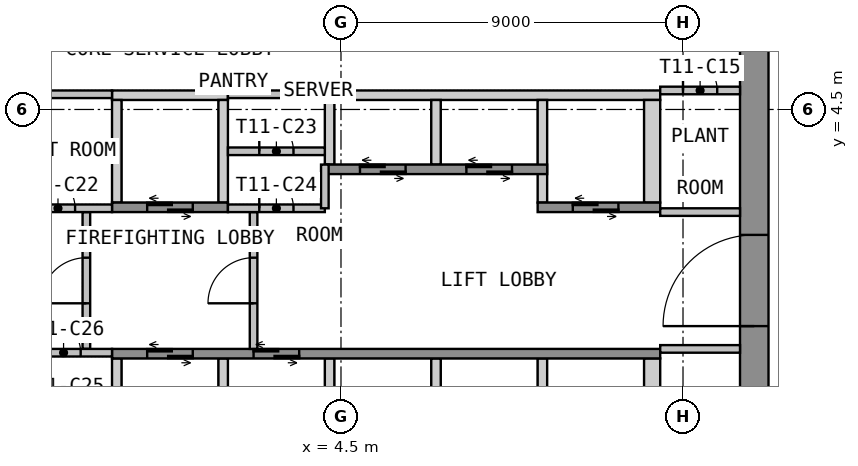
"""IFC4 building model, lengths in metres.
Left out: names, types, materials, properties, quantities, classifications, styles, units other than length and angle.
Written with IfcOpenShell. Run it as: python <this file> out.ifc"""

import sys

from ifc_helpers import new_model, si_unit, direction, frame, frame_2d, origin, place, context, subcontext, project, spatial, polyline, rectangle, outline, extrude, element, fill, save


model = new_model("IFC4")
c1 = context("Model", 3, precision=1e-05, world=origin(), true_north=direction((0.0, 1.0)))
c2 = subcontext(c1, "Body", "Model", "MODEL_VIEW")
j1 = project(units=[si_unit("LENGTHUNIT", "METRE"), si_unit("PLANEANGLEUNIT", "RADIAN")], contexts=[c1])
p1 = place(None, origin())
s1 = spatial("IfcSite", under=j1, at=p1, CompositionType="ELEMENT")
p2 = place(p1, origin())
s2 = spatial("IfcBuilding", under=s1, at=p2, CompositionType="ELEMENT")
p3 = place(p2, frame((0.0, 0.0, 156.0)))
s3 = spatial("IfcBuildingStorey", under=s2, at=p3, CompositionType="ELEMENT", Elevation=156.0)
p4 = place(p3, frame((15.375, -12.75, 0.0), z_axis=(0.0, 0.0, 1.0), x_axis=(0.0, 1.0, 0.0)))
e1 = element("IfcWall", 1, at=p4, inside=s3, PredefinedType="SHEAR", context=c2, shape_type="SweptSolid", body=[
    extrude(rectangle(XDim=25.5, YDim=0.75, at=frame_2d((12.75, 0.0))), origin(), (0.0, 0.0, 1.0), 3.575),
])
p5 = place(p4, frame((11.55, 0.0, 0.0)))
e2 = element("IfcOpeningElement", 2, at=p5, cuts=e1, PredefinedType="OPENING", context=c2, shape_type="SweptSolid", body=[
    extrude(rectangle(XDim=2.4, YDim=2.1, at=frame_2d((1.2, 1.05))), frame((0.0, 0.385, 0.0), z_axis=(0.0, -1.0, 0.0), x_axis=(1.0, 0.0, 0.0)), (0.0, 0.0, 1.0), 0.77),
])
p6 = place(p3, origin())
e3 = element("IfcWall", 3, at=p6, inside=s3, PredefinedType="SHEAR", context=c2, shape_type="SweptSolid", body=[
    extrude(outline(polyline([(-1.525, 4.75), (1.525, 4.75), (1.525, 5.0), (-1.525, 5.0), (-1.525, 4.75)])), origin(), (0.0, 0.0, 1.0), 3.575),
])
p7 = place(p3, origin())
e4 = element("IfcWall", 4, at=p7, inside=s3, PredefinedType="SHEAR", context=c2, shape_type="SweptSolid", body=[
    extrude(outline(polyline([(4.075, 4.75), (12.9, 4.75), (12.9, 5.0), (4.075, 5.0), (4.075, 4.75)])), origin(), (0.0, 0.0, 1.0), 3.575),
])
p8 = place(p3, origin())
e5 = element("IfcWall", 5, at=p8, inside=s3, PredefinedType="SHEAR", context=c2, shape_type="SweptSolid", body=[
    extrude(outline(polyline([(-1.525, 2.05), (-1.275, 2.05), (-1.275, 4.75), (-1.525, 4.75), (-1.525, 2.05)])), origin(), (0.0, 0.0, 1.0), 3.575),
])
p9 = place(p3, origin())
e6 = element("IfcWall", 6, at=p9, inside=s3, PredefinedType="SHEAR", context=c2, shape_type="SweptSolid", body=[
    extrude(outline(polyline([(1.275, 2.05), (1.525, 2.05), (1.525, 4.75), (1.275, 4.75), (1.275, 2.05)])), origin(), (0.0, 0.0, 1.0), 3.575),
])
p10 = place(p3, origin())
e7 = element("IfcWall", 7, at=p10, inside=s3, PredefinedType="SHEAR", context=c2, shape_type="SweptSolid", body=[
    extrude(outline(polyline([(9.675, 2.05), (9.925, 2.05), (9.925, 4.75), (9.675, 4.75), (9.675, 2.05)])), origin(), (0.0, 0.0, 1.0), 3.575),
])
p11 = place(p3, origin())
e8 = element("IfcWall", 8, at=p11, inside=s3, PredefinedType="SHEAR", context=c2, shape_type="SweptSolid", body=[
    extrude(outline(polyline([(12.475, 2.05), (12.9, 2.05), (12.9, 4.75), (12.475, 4.75), (12.475, 2.05)])), origin(), (0.0, 0.0, 1.0), 3.575),
])
p12 = place(p3, origin())
e9 = element("IfcWall", 9, at=p12, inside=s3, PredefinedType="SHEAR", context=c2, shape_type="SweptSolid", body=[
    extrude(outline(polyline([(4.075, 3.05), (4.325, 3.05), (4.325, 4.75), (4.075, 4.75), (4.075, 3.05)])), origin(), (0.0, 0.0, 1.0), 3.575),
])
p13 = place(p3, origin())
e10 = element("IfcWall", 10, at=p13, inside=s3, PredefinedType="SHEAR", context=c2, shape_type="SweptSolid", body=[
    extrude(outline(polyline([(6.875, 3.05), (7.125, 3.05), (7.125, 4.75), (6.875, 4.75), (6.875, 3.05)])), origin(), (0.0, 0.0, 1.0), 3.575),
])
p14 = place(p3, frame((-1.525, 1.925, 0.0), z_axis=(0.0, 0.0, 1.0), x_axis=(1.0, 0.0, 0.0)))
e11 = element("IfcWall", 11, at=p14, inside=s3, PredefinedType="SHEAR", context=c2, shape_type="SweptSolid", body=[
    extrude(rectangle(XDim=3.05, YDim=0.25, at=frame_2d((1.525, 0.0))), origin(), (0.0, 0.0, 1.0), 3.575),
])
p15 = place(p14, frame((0.925, 0.0, 0.0)))
e12 = element("IfcOpeningElement", 12, at=p15, cuts=e11, PredefinedType="OPENING", context=c2, shape_type="SweptSolid", body=[
    extrude(rectangle(XDim=1.2, YDim=2.1, at=frame_2d((0.6, 1.05))), frame((0.0, 0.135, 0.0), z_axis=(0.0, -1.0, 0.0), x_axis=(1.0, 0.0, 0.0)), (0.0, 0.0, 1.0), 0.27),
])
p16 = place(p3, frame((4.075, 2.925, 0.0), z_axis=(0.0, 0.0, 1.0), x_axis=(1.0, 0.0, 0.0)))
e13 = element("IfcWall", 13, at=p16, inside=s3, PredefinedType="SHEAR", context=c2, shape_type="SweptSolid", body=[
    extrude(rectangle(XDim=5.85, YDim=0.25, at=frame_2d((2.925, 0.0))), origin(), (0.0, 0.0, 1.0), 3.575),
])
p17 = place(p16, frame((0.925, 0.0, 0.0)))
e14 = element("IfcOpeningElement", 14, at=p17, cuts=e13, PredefinedType="OPENING", context=c2, shape_type="SweptSolid", body=[
    extrude(rectangle(XDim=1.2, YDim=2.1, at=frame_2d((0.6, 1.05))), frame((0.0, 0.135, 0.0), z_axis=(0.0, -1.0, 0.0), x_axis=(1.0, 0.0, 0.0)), (0.0, 0.0, 1.0), 0.27),
])
p18 = place(p16, frame((3.725, 0.0, 0.0)))
e15 = element("IfcOpeningElement", 15, at=p18, cuts=e13, PredefinedType="OPENING", context=c2, shape_type="SweptSolid", body=[
    extrude(rectangle(XDim=1.2, YDim=2.1, at=frame_2d((0.6, 1.05))), frame((0.0, 0.135, 0.0), z_axis=(0.0, -1.0, 0.0), x_axis=(1.0, 0.0, 0.0)), (0.0, 0.0, 1.0), 0.27),
])
p19 = place(p3, frame((9.675, 1.925, 0.0), z_axis=(0.0, 0.0, 1.0), x_axis=(1.0, 0.0, 0.0)))
e16 = element("IfcWall", 16, at=p19, inside=s3, PredefinedType="SHEAR", context=c2, shape_type="SweptSolid", body=[
    extrude(rectangle(XDim=3.225, YDim=0.25, at=frame_2d((1.612, 0.0))), origin(), (0.0, 0.0, 1.0), 3.575),
])
p20 = place(p19, frame((0.925, 0.0, 0.0)))
e17 = element("IfcOpeningElement", 17, at=p20, cuts=e16, PredefinedType="OPENING", context=c2, shape_type="SweptSolid", body=[
    extrude(rectangle(XDim=1.2, YDim=2.1, at=frame_2d((0.6, 1.05))), frame((0.0, 0.135, 0.0), z_axis=(0.0, -1.0, 0.0), x_axis=(1.0, 0.0, 0.0)), (0.0, 0.0, 1.0), 0.27),
])
p21 = place(p3, origin())
e18 = element("IfcWall", 18, at=p21, inside=s3, PredefinedType="SHEAR", context=c2, shape_type="SweptSolid", body=[
    extrude(outline(polyline([(-1.525, -4.75), (-1.275, -4.75), (-1.275, -2.05), (-1.525, -2.05), (-1.525, -4.75)])), origin(), (0.0, 0.0, 1.0), 3.575),
])
p22 = place(p3, origin())
e19 = element("IfcWall", 19, at=p22, inside=s3, PredefinedType="SHEAR", context=c2, shape_type="SweptSolid", body=[
    extrude(outline(polyline([(1.275, -4.75), (1.525, -4.75), (1.525, -2.05), (1.275, -2.05), (1.275, -4.75)])), origin(), (0.0, 0.0, 1.0), 3.575),
])
p23 = place(p3, origin())
e20 = element("IfcWall", 20, at=p23, inside=s3, PredefinedType="SHEAR", context=c2, shape_type="SweptSolid", body=[
    extrude(outline(polyline([(4.075, -4.75), (4.325, -4.75), (4.325, -2.05), (4.075, -2.05), (4.075, -4.75)])), origin(), (0.0, 0.0, 1.0), 3.575),
])
p24 = place(p3, origin())
e21 = element("IfcWall", 21, at=p24, inside=s3, PredefinedType="SHEAR", context=c2, shape_type="SweptSolid", body=[
    extrude(outline(polyline([(6.875, -4.75), (7.125, -4.75), (7.125, -2.05), (6.875, -2.05), (6.875, -4.75)])), origin(), (0.0, 0.0, 1.0), 3.575),
])
p25 = place(p3, origin())
e22 = element("IfcWall", 22, at=p25, inside=s3, PredefinedType="SHEAR", context=c2, shape_type="SweptSolid", body=[
    extrude(outline(polyline([(9.675, -4.75), (9.925, -4.75), (9.925, -2.05), (9.675, -2.05), (9.675, -4.75)])), origin(), (0.0, 0.0, 1.0), 3.575),
])
p26 = place(p3, origin())
e23 = element("IfcWall", 23, at=p26, inside=s3, PredefinedType="SHEAR", context=c2, shape_type="SweptSolid", body=[
    extrude(outline(polyline([(12.475, -4.75), (12.9, -4.75), (12.9, -2.05), (12.475, -2.05), (12.475, -4.75)])), origin(), (0.0, 0.0, 1.0), 3.575),
])
p27 = place(p3, frame((-1.525, -1.925, 0.0), z_axis=(0.0, 0.0, 1.0), x_axis=(1.0, 0.0, 0.0)))
e24 = element("IfcWall", 24, at=p27, inside=s3, PredefinedType="SHEAR", context=c2, shape_type="SweptSolid", body=[
    extrude(rectangle(XDim=14.425, YDim=0.25, at=frame_2d((7.212, 0.0))), origin(), (0.0, 0.0, 1.0), 3.575),
])
p28 = place(p27, frame((0.925, 0.0, 0.0)))
e25 = element("IfcOpeningElement", 25, at=p28, cuts=e24, PredefinedType="OPENING", context=c2, shape_type="SweptSolid", body=[
    extrude(rectangle(XDim=1.2, YDim=2.1, at=frame_2d((0.6, 1.05))), frame((0.0, 0.135, 0.0), z_axis=(0.0, -1.0, 0.0), x_axis=(1.0, 0.0, 0.0)), (0.0, 0.0, 1.0), 0.27),
])
p29 = place(p27, frame((3.725, 0.0, 0.0)))
e26 = element("IfcOpeningElement", 26, at=p29, cuts=e24, PredefinedType="OPENING", context=c2, shape_type="SweptSolid", body=[
    extrude(rectangle(XDim=1.2, YDim=2.1, at=frame_2d((0.6, 1.05))), frame((0.0, 0.135, 0.0), z_axis=(0.0, -1.0, 0.0), x_axis=(1.0, 0.0, 0.0)), (0.0, 0.0, 1.0), 0.27),
])
p30 = place(p3, frame((-2.2, -1.8, 0.0), z_axis=(0.0, 0.0, 1.0), x_axis=(0.0, 1.0, 0.0)))
e27 = element("IfcWall", 27, at=p30, inside=s3, PredefinedType="PARTITIONING", context=c2, shape_type="SweptSolid", body=[
    extrude(rectangle(XDim=3.6, YDim=0.2, at=frame_2d((1.8, 0.0))), origin(), (0.0, 0.0, 1.0), 3.575),
])
p31 = place(p30, frame((1.2, 0.0, 0.0)))
e28 = element("IfcOpeningElement", 28, at=p31, cuts=e27, PredefinedType="OPENING", context=c2, shape_type="SweptSolid", body=[
    extrude(rectangle(XDim=1.2, YDim=2.1, at=frame_2d((0.6, 1.05))), frame((0.0, 0.11, 0.0), z_axis=(0.0, -1.0, 0.0), x_axis=(1.0, 0.0, 0.0)), (0.0, 0.0, 1.0), 0.22),
])
p32 = place(p3, frame((2.2, -1.8, 0.0), z_axis=(0.0, 0.0, 1.0), x_axis=(0.0, 1.0, 0.0)))
e29 = element("IfcWall", 29, at=p32, inside=s3, PredefinedType="PARTITIONING", context=c2, shape_type="SweptSolid", body=[
    extrude(rectangle(XDim=3.6, YDim=0.2, at=frame_2d((1.8, 0.0))), origin(), (0.0, 0.0, 1.0), 3.575),
])
p33 = place(p32, frame((1.2, 0.0, 0.0)))
e30 = element("IfcOpeningElement", 30, at=p33, cuts=e29, PredefinedType="OPENING", context=c2, shape_type="SweptSolid", body=[
    extrude(rectangle(XDim=1.2, YDim=2.1, at=frame_2d((0.6, 1.05))), frame((0.0, 0.11, 0.0), z_axis=(0.0, -1.0, 0.0), x_axis=(1.0, 0.0, 0.0)), (0.0, 0.0, 1.0), 0.22),
])
p34 = place(p3, frame((12.9, 5.0, 0.0), z_axis=(0.0, 0.0, 1.0), x_axis=(1.0, 0.0, 0.0)))
e31 = element("IfcWall", 31, at=p34, inside=s3, PredefinedType="PARTITIONING", context=c2, shape_type="SweptSolid", body=[
    extrude(rectangle(XDim=2.1, YDim=0.2, at=frame_2d((1.05, 0.0))), origin(), (0.0, 0.0, 1.0), 3.575),
])
p35 = place(p34, frame((0.6, 0.0, 0.0)))
e32 = element("IfcOpeningElement", 32, at=p35, cuts=e31, PredefinedType="OPENING", context=c2, shape_type="SweptSolid", body=[
    extrude(rectangle(XDim=0.9, YDim=2.1, at=frame_2d((0.45, 1.05))), frame((0.0, 0.11, 0.0), z_axis=(0.0, -1.0, 0.0), x_axis=(1.0, 0.0, 0.0)), (0.0, 0.0, 1.0), 0.22),
])
for number, where, z_axis, x_axis in (
    (33, (12.9, 1.8, 0.0), (0.0, 0.0, 1.0), (1.0, 0.0, 0.0)),
    (34, (12.9, -1.8, 0.0), (0.0, 0.0, 1.0), (1.0, 0.0, 0.0)),
):
    element("IfcWall", number, at=place(p3, frame(where, z_axis=z_axis, x_axis=x_axis)), inside=s3, PredefinedType="PARTITIONING", context=c2, shape_type="SweptSolid", body=[
        extrude(rectangle(XDim=2.1, YDim=0.2, at=frame_2d((1.05, 0.0))), origin(), (0.0, 0.0, 1.0), 3.575),
    ])
p36 = place(p3, frame((-12.9, 1.9, 0.0), z_axis=(0.0, 0.0, 1.0), x_axis=(1.0, 0.0, 0.0)))
e35 = element("IfcWall", 35, at=p36, inside=s3, PredefinedType="PARTITIONING", context=c2, shape_type="SweptSolid", body=[
    extrude(rectangle(XDim=11.375, YDim=0.2, at=frame_2d((5.688, 0.0))), origin(), (0.0, 0.0, 1.0), 3.575),
])
p37 = place(p36, frame((0.972, 0.0, 0.0)))
e36 = element("IfcOpeningElement", 36, at=p37, cuts=e35, PredefinedType="OPENING", context=c2, shape_type="SweptSolid", body=[
    extrude(rectangle(XDim=0.9, YDim=2.1, at=frame_2d((0.45, 1.05))), frame((0.0, 0.11, 0.0), z_axis=(0.0, -1.0, 0.0), x_axis=(1.0, 0.0, 0.0)), (0.0, 0.0, 1.0), 0.22),
])
p38 = place(p36, frame((5.087, 0.0, 0.0)))
e37 = element("IfcOpeningElement", 37, at=p38, cuts=e35, PredefinedType="OPENING", context=c2, shape_type="SweptSolid", body=[
    extrude(rectangle(XDim=1.2, YDim=2.1, at=frame_2d((0.6, 1.05))), frame((0.0, 0.11, 0.0), z_axis=(0.0, -1.0, 0.0), x_axis=(1.0, 0.0, 0.0)), (0.0, 0.0, 1.0), 0.22),
])
p39 = place(p36, frame((9.503, 0.0, 0.0)))
e38 = element("IfcOpeningElement", 38, at=p39, cuts=e35, PredefinedType="OPENING", context=c2, shape_type="SweptSolid", body=[
    extrude(rectangle(XDim=0.9, YDim=2.1, at=frame_2d((0.45, 1.05))), frame((0.0, 0.11, 0.0), z_axis=(0.0, -1.0, 0.0), x_axis=(1.0, 0.0, 0.0)), (0.0, 0.0, 1.0), 0.22),
])
p40 = place(p3, frame((-12.9, 4.9, 0.0), z_axis=(0.0, 0.0, 1.0), x_axis=(1.0, 0.0, 0.0)))
e39 = element("IfcWall", 39, at=p40, inside=s3, PredefinedType="PARTITIONING", context=c2, shape_type="SweptSolid", body=[
    extrude(rectangle(XDim=11.375, YDim=0.2, at=frame_2d((5.688, 0.0))), origin(), (0.0, 0.0, 1.0), 3.575),
])
p41 = place(p3, frame((1.525, 3.4, 0.0), z_axis=(0.0, 0.0, 1.0), x_axis=(1.0, 0.0, 0.0)))
e40 = element("IfcWall", 40, at=p41, inside=s3, PredefinedType="PARTITIONING", context=c2, shape_type="SweptSolid", body=[
    extrude(rectangle(XDim=2.55, YDim=0.2, at=frame_2d((1.275, 0.0))), origin(), (0.0, 0.0, 1.0), 3.575),
])
p42 = place(p41, frame((0.825, 0.0, 0.0)))
e41 = element("IfcOpeningElement", 41, at=p42, cuts=e40, PredefinedType="OPENING", context=c2, shape_type="SweptSolid", body=[
    extrude(rectangle(XDim=0.9, YDim=2.1, at=frame_2d((0.45, 1.05))), frame((0.0, 0.11, 0.0), z_axis=(0.0, -1.0, 0.0), x_axis=(1.0, 0.0, 0.0)), (0.0, 0.0, 1.0), 0.22),
])
p43 = place(p3, frame((1.525, 1.9, 0.0), z_axis=(0.0, 0.0, 1.0), x_axis=(1.0, 0.0, 0.0)))
e42 = element("IfcWall", 42, at=p43, inside=s3, PredefinedType="PARTITIONING", context=c2, shape_type="SweptSolid", body=[
    extrude(rectangle(XDim=2.55, YDim=0.2, at=frame_2d((1.275, 0.0))), origin(), (0.0, 0.0, 1.0), 3.575),
])
p44 = place(p43, frame((0.825, 0.0, 0.0)))
e43 = element("IfcOpeningElement", 43, at=p44, cuts=e42, PredefinedType="OPENING", context=c2, shape_type="SweptSolid", body=[
    extrude(rectangle(XDim=0.9, YDim=2.1, at=frame_2d((0.45, 1.05))), frame((0.0, 0.11, 0.0), z_axis=(0.0, -1.0, 0.0), x_axis=(1.0, 0.0, 0.0)), (0.0, 0.0, 1.0), 0.22),
])
p45 = place(p3, frame((1.525, 4.9, 0.0), z_axis=(0.0, 0.0, 1.0), x_axis=(1.0, 0.0, 0.0)))
e44 = element("IfcWall", 44, at=p45, inside=s3, PredefinedType="PARTITIONING", context=c2, shape_type="SweptSolid", body=[
    extrude(rectangle(XDim=2.55, YDim=0.2, at=frame_2d((1.275, 0.0))), origin(), (0.0, 0.0, 1.0), 3.575),
])
p46 = place(p3, frame((4.075, 1.9, 0.0), z_axis=(0.0, 0.0, 1.0), x_axis=(0.0, 1.0, 0.0)))
e45 = element("IfcWall", 45, at=p46, inside=s3, PredefinedType="PARTITIONING", context=c2, shape_type="SweptSolid", body=[
    extrude(rectangle(XDim=1.15, YDim=0.2, at=frame_2d((0.575, 0.0))), origin(), (0.0, 0.0, 1.0), 3.575),
])
p47 = place(p3, frame((-4.075, -1.9, 0.0), z_axis=(0.0, 0.0, 1.0), x_axis=(1.0, 0.0, 0.0)))
e46 = element("IfcWall", 46, at=p47, inside=s3, PredefinedType="PARTITIONING", context=c2, shape_type="SweptSolid", body=[
    extrude(rectangle(XDim=2.55, YDim=0.2, at=frame_2d((1.275, 0.0))), origin(), (0.0, 0.0, 1.0), 3.575),
])
p48 = place(p47, frame((0.825, 0.0, 0.0)))
e47 = element("IfcOpeningElement", 47, at=p48, cuts=e46, PredefinedType="OPENING", context=c2, shape_type="SweptSolid", body=[
    extrude(rectangle(XDim=0.9, YDim=2.1, at=frame_2d((0.45, 1.05))), frame((0.0, 0.11, 0.0), z_axis=(0.0, -1.0, 0.0), x_axis=(1.0, 0.0, 0.0)), (0.0, 0.0, 1.0), 0.22),
])
p49 = place(p5, origin())
e48 = element("IfcDoor", 48, at=p49, inside=s3, OperationType="DOUBLE_DOOR_DOUBLE_SWING", PredefinedType="DOOR", context=c2, shape_type="SweptSolid", body=[
    extrude(rectangle(XDim=2.4, YDim=2.1, at=frame_2d((1.2, 1.05))), frame((0.0, 0.025, 0.0), z_axis=(0.0, -1.0, 0.0), x_axis=(1.0, 0.0, 0.0)), (0.0, 0.0, 1.0), 0.05),
])
fill(e2, e48)
p50 = place(p15, origin())
e49 = element("IfcDoor", 49, at=p50, inside=s3, OperationType="DOUBLE_DOOR_SLIDING", PredefinedType="DOOR", context=c2, shape_type="SweptSolid", body=[
    extrude(rectangle(XDim=1.2, YDim=2.1, at=frame_2d((0.6, 1.05))), frame((0.0, 0.025, 0.0), z_axis=(0.0, -1.0, 0.0), x_axis=(1.0, 0.0, 0.0)), (0.0, 0.0, 1.0), 0.05),
])
fill(e12, e49)
p51 = place(p17, origin())
e50 = element("IfcDoor", 50, at=p51, inside=s3, OperationType="DOUBLE_DOOR_SLIDING", PredefinedType="DOOR", context=c2, shape_type="SweptSolid", body=[
    extrude(rectangle(XDim=1.2, YDim=2.1, at=frame_2d((0.6, 1.05))), frame((0.0, 0.025, 0.0), z_axis=(0.0, -1.0, 0.0), x_axis=(1.0, 0.0, 0.0)), (0.0, 0.0, 1.0), 0.05),
])
fill(e14, e50)
p52 = place(p18, origin())
e51 = element("IfcDoor", 51, at=p52, inside=s3, OperationType="DOUBLE_DOOR_SLIDING", PredefinedType="DOOR", context=c2, shape_type="SweptSolid", body=[
    extrude(rectangle(XDim=1.2, YDim=2.1, at=frame_2d((0.6, 1.05))), frame((0.0, 0.025, 0.0), z_axis=(0.0, -1.0, 0.0), x_axis=(1.0, 0.0, 0.0)), (0.0, 0.0, 1.0), 0.05),
])
fill(e15, e51)
p53 = place(p20, origin())
e52 = element("IfcDoor", 52, at=p53, inside=s3, OperationType="DOUBLE_DOOR_SLIDING", PredefinedType="DOOR", context=c2, shape_type="SweptSolid", body=[
    extrude(rectangle(XDim=1.2, YDim=2.1, at=frame_2d((0.6, 1.05))), frame((0.0, 0.025, 0.0), z_axis=(0.0, -1.0, 0.0), x_axis=(1.0, 0.0, 0.0)), (0.0, 0.0, 1.0), 0.05),
])
fill(e17, e52)
p54 = place(p28, origin())
e53 = element("IfcDoor", 53, at=p54, inside=s3, OperationType="DOUBLE_DOOR_SLIDING", PredefinedType="DOOR", context=c2, shape_type="SweptSolid", body=[
    extrude(rectangle(XDim=1.2, YDim=2.1, at=frame_2d((0.6, 1.05))), frame((0.0, 0.025, 0.0), z_axis=(0.0, -1.0, 0.0), x_axis=(1.0, 0.0, 0.0)), (0.0, 0.0, 1.0), 0.05),
])
fill(e25, e53)
p55 = place(p29, origin())
e54 = element("IfcDoor", 54, at=p55, inside=s3, OperationType="DOUBLE_DOOR_SLIDING", PredefinedType="DOOR", context=c2, shape_type="SweptSolid", body=[
    extrude(rectangle(XDim=1.2, YDim=2.1, at=frame_2d((0.6, 1.05))), frame((0.0, 0.025, 0.0), z_axis=(0.0, -1.0, 0.0), x_axis=(1.0, 0.0, 0.0)), (0.0, 0.0, 1.0), 0.05),
])
fill(e26, e54)
p56 = place(p31, origin())
e55 = element("IfcDoor", 55, at=p56, inside=s3, OperationType="SINGLE_SWING_LEFT", PredefinedType="DOOR", context=c2, shape_type="SweptSolid", body=[
    extrude(rectangle(XDim=1.2, YDim=2.1, at=frame_2d((0.6, 1.05))), frame((0.0, 0.025, 0.0), z_axis=(0.0, -1.0, 0.0), x_axis=(1.0, 0.0, 0.0)), (0.0, 0.0, 1.0), 0.05),
])
fill(e28, e55)
p57 = place(p33, origin())
e56 = element("IfcDoor", 56, at=p57, inside=s3, OperationType="SINGLE_SWING_LEFT", PredefinedType="DOOR", context=c2, shape_type="SweptSolid", body=[
    extrude(rectangle(XDim=1.2, YDim=2.1, at=frame_2d((0.6, 1.05))), frame((0.0, 0.025, 0.0), z_axis=(0.0, -1.0, 0.0), x_axis=(1.0, 0.0, 0.0)), (0.0, 0.0, 1.0), 0.05),
])
fill(e30, e56)
p58 = place(p35, origin())
e57 = element("IfcDoor", 57, at=p58, inside=s3, OperationType="SINGLE_SWING_LEFT", PredefinedType="DOOR", context=c2, shape_type="SweptSolid", body=[
    extrude(rectangle(XDim=0.9, YDim=2.1, at=frame_2d((0.45, 1.05))), frame((0.0, 0.025, 0.0), z_axis=(0.0, -1.0, 0.0), x_axis=(1.0, 0.0, 0.0)), (0.0, 0.0, 1.0), 0.05),
])
fill(e32, e57)
p59 = place(p39, origin())
e58 = element("IfcDoor", 58, at=p59, inside=s3, OperationType="SINGLE_SWING_LEFT", PredefinedType="DOOR", context=c2, shape_type="SweptSolid", body=[
    extrude(rectangle(XDim=0.9, YDim=2.1, at=frame_2d((0.45, 1.05))), frame((0.0, 0.025, 0.0), z_axis=(0.0, -1.0, 0.0), x_axis=(1.0, 0.0, 0.0)), (0.0, 0.0, 1.0), 0.05),
])
fill(e38, e58)
p60 = place(p42, origin())
e59 = element("IfcDoor", 59, at=p60, inside=s3, OperationType="SINGLE_SWING_LEFT", PredefinedType="DOOR", context=c2, shape_type="SweptSolid", body=[
    extrude(rectangle(XDim=0.9, YDim=2.1, at=frame_2d((0.45, 1.05))), frame((0.0, 0.025, 0.0), z_axis=(0.0, -1.0, 0.0), x_axis=(1.0, 0.0, 0.0)), (0.0, 0.0, 1.0), 0.05),
])
fill(e41, e59)
p61 = place(p44, origin())
e60 = element("IfcDoor", 60, at=p61, inside=s3, OperationType="SINGLE_SWING_LEFT", PredefinedType="DOOR", context=c2, shape_type="SweptSolid", body=[
    extrude(rectangle(XDim=0.9, YDim=2.1, at=frame_2d((0.45, 1.05))), frame((0.0, 0.025, 0.0), z_axis=(0.0, -1.0, 0.0), x_axis=(1.0, 0.0, 0.0)), (0.0, 0.0, 1.0), 0.05),
])
fill(e43, e60)
p62 = place(p48, origin())
e61 = element("IfcDoor", 61, at=p62, inside=s3, OperationType="SINGLE_SWING_LEFT", PredefinedType="DOOR", context=c2, shape_type="SweptSolid", body=[
    extrude(rectangle(XDim=0.9, YDim=2.1, at=frame_2d((0.45, 1.05))), frame((0.0, 0.025, 0.0), z_axis=(0.0, -1.0, 0.0), x_axis=(1.0, 0.0, 0.0)), (0.0, 0.0, 1.0), 0.05),
])
fill(e47, e61)
save(model, sys.argv[1])
